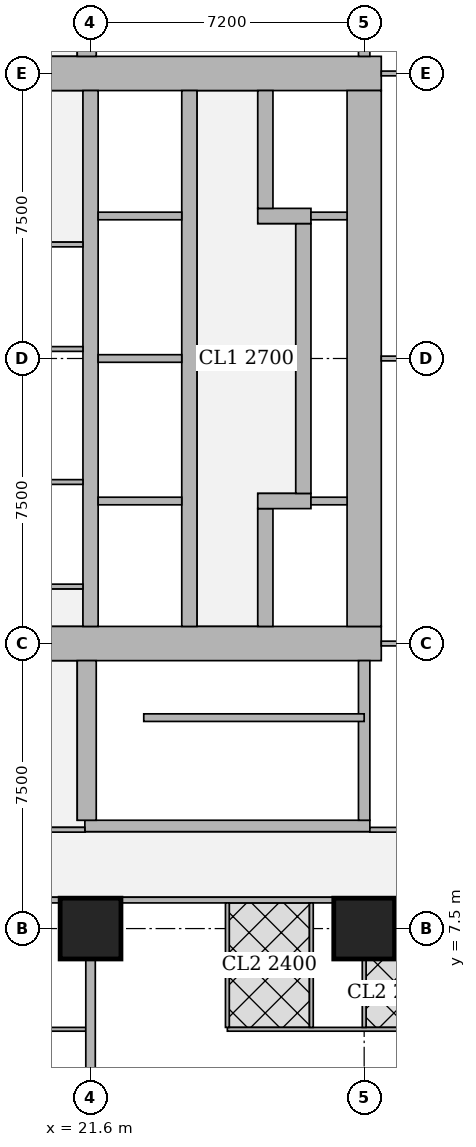
"""IFC4 building model, lengths in metres.
Left out: names, types, materials, properties, quantities, classifications, styles, units other than length and angle.
Written with IfcOpenShell. Run it as: python <this file> out.ifc"""

import sys

from ifc_helpers import new_model, si_unit, direction, frame, frame_2d, origin, origin_2d, place, context, subcontext, project, spatial, rectangle, extrude, element, fill, save


model = new_model("IFC4")
c1 = context("Model", 3, precision=1e-05, world=origin(), true_north=direction((0.0, 1.0)))
c2 = subcontext(c1, "Body", "Model", "MODEL_VIEW")
j1 = project(units=[si_unit("LENGTHUNIT", "METRE"), si_unit("PLANEANGLEUNIT", "RADIAN")], contexts=[c1])
p1 = place(None, origin())
s1 = spatial("IfcSite", under=j1, at=p1, CompositionType="ELEMENT")
p2 = place(p1, origin())
s2 = spatial("IfcBuilding", under=s1, at=p2, CompositionType="ELEMENT")
p3 = place(p2, frame((0.0, 0.0, 100.4)))
s3 = spatial("IfcBuildingStorey", under=s2, at=p3, CompositionType="ELEMENT", Elevation=100.4)
for number, where, z_axis, x_axis in (
    (1, (21.6, 7.5, 0.0), (0.0, 0.0, 1.0), (1.0, 0.0, 0.0)),
    (2, (28.8, 7.5, 0.0), (0.0, 0.0, 1.0), (1.0, 0.0, 0.0)),
):
    element("IfcColumn", number, at=place(p3, frame(where, z_axis=z_axis, x_axis=x_axis)), inside=s3, PredefinedType="COLUMN", context=c2, shape_type="SweptSolid", body=[
        extrude(rectangle(XDim=1.6, YDim=1.6, at=origin_2d()), origin(), (0.0, 0.0, 1.0), 3.75),
    ])
p4 = place(p3, frame((13.95, 15.0, 0.0), z_axis=(0.0, 0.0, 1.0), x_axis=(1.0, 0.0, 0.0)))
e3 = element("IfcWall", 3, at=p4, inside=s3, PredefinedType="SHEAR", context=c2, shape_type="SweptSolid", body=[
    extrude(rectangle(XDim=15.3, YDim=0.9, at=frame_2d((7.65, 0.0))), origin(), (0.0, 0.0, 1.0), 3.75),
])
p5 = place(p4, frame((4.45, 0.0, 0.0)))
e4 = element("IfcOpeningElement", 4, at=p5, cuts=e3, PredefinedType="OPENING", context=c2, shape_type="SweptSolid", body=[
    extrude(rectangle(XDim=1.8, YDim=2.1, at=frame_2d((0.9, 1.05))), frame((0.0, 0.46, 0.0), z_axis=(0.0, -1.0, 0.0), x_axis=(1.0, 0.0, 0.0)), (0.0, 0.0, 1.0), 0.92),
])
p6 = place(p4, frame((10.7, 0.0, 0.0)))
e5 = element("IfcOpeningElement", 5, at=p6, cuts=e3, PredefinedType="OPENING", context=c2, shape_type="SweptSolid", body=[
    extrude(rectangle(XDim=1.1, YDim=2.1, at=frame_2d((0.55, 1.05))), frame((0.0, 0.46, 0.0), z_axis=(0.0, -1.0, 0.0), x_axis=(1.0, 0.0, 0.0)), (0.0, 0.0, 1.0), 0.92),
])
p7 = place(p3, frame((13.95, 30.0, 0.0), z_axis=(0.0, 0.0, 1.0), x_axis=(1.0, 0.0, 0.0)))
e6 = element("IfcWall", 6, at=p7, inside=s3, PredefinedType="SHEAR", context=c2, shape_type="SweptSolid", body=[
    extrude(rectangle(XDim=15.3, YDim=0.9, at=frame_2d((7.65, 0.0))), origin(), (0.0, 0.0, 1.0), 3.75),
])
p8 = place(p7, frame((4.45, 0.0, 0.0)))
e7 = element("IfcOpeningElement", 7, at=p8, cuts=e6, PredefinedType="OPENING", context=c2, shape_type="SweptSolid", body=[
    extrude(rectangle(XDim=1.8, YDim=2.1, at=frame_2d((0.9, 1.05))), frame((0.0, 0.46, 0.0), z_axis=(0.0, -1.0, 0.0), x_axis=(1.0, 0.0, 0.0)), (0.0, 0.0, 1.0), 0.92),
])
p9 = place(p7, frame((10.7, 0.0, 0.0)))
e8 = element("IfcOpeningElement", 8, at=p9, cuts=e6, PredefinedType="OPENING", context=c2, shape_type="SweptSolid", body=[
    extrude(rectangle(XDim=1.1, YDim=2.1, at=frame_2d((0.55, 1.05))), frame((0.0, 0.46, 0.0), z_axis=(0.0, -1.0, 0.0), x_axis=(1.0, 0.0, 0.0)), (0.0, 0.0, 1.0), 0.92),
])
p10 = place(p3, frame((28.8, 15.45, 0.0), z_axis=(0.0, 0.0, 1.0), x_axis=(0.0, 1.0, 0.0)))
e9 = element("IfcWall", 9, at=p10, inside=s3, PredefinedType="SHEAR", context=c2, shape_type="SweptSolid", body=[
    extrude(rectangle(XDim=14.1, YDim=0.9, at=frame_2d((7.05, 0.0))), origin(), (0.0, 0.0, 1.0), 3.75),
])
for number, where, z_axis, x_axis in (
    (10, (21.6, 15.45, 0.0), (0.0, 0.0, 1.0), (0.0, 1.0, 0.0)),
    (11, (24.2, 15.45, 0.0), (0.0, 0.0, 1.0), (0.0, 1.0, 0.0)),
):
    element("IfcWall", number, at=place(p3, frame(where, z_axis=z_axis, x_axis=x_axis)), inside=s3, PredefinedType="SHEAR", context=c2, shape_type="SweptSolid", body=[
        extrude(rectangle(XDim=14.1, YDim=0.4, at=frame_2d((7.05, 0.0))), origin(), (0.0, 0.0, 1.0), 3.75),
    ])
p11 = place(p3, frame((26.2, 15.45, 0.0), z_axis=(0.0, 0.0, 1.0), x_axis=(0.0, 1.0, 0.0)))
e12 = element("IfcWall", 12, at=p11, inside=s3, PredefinedType="SHEAR", context=c2, shape_type="SweptSolid", body=[
    extrude(rectangle(XDim=3.1, YDim=0.4, at=frame_2d((1.55, 0.0))), origin(), (0.0, 0.0, 1.0), 3.75),
])
p12 = place(p11, frame((0.825, 0.0, 0.0)))
e13 = element("IfcOpeningElement", 13, at=p12, cuts=e12, PredefinedType="OPENING", context=c2, shape_type="SweptSolid", body=[
    extrude(rectangle(XDim=1.2, YDim=2.1, at=frame_2d((0.6, 1.05))), frame((0.0, 0.21, 0.0), z_axis=(0.0, -1.0, 0.0), x_axis=(1.0, 0.0, 0.0)), (0.0, 0.0, 1.0), 0.42),
])
p13 = place(p3, frame((26.0, 18.75, 0.0), z_axis=(0.0, 0.0, 1.0), x_axis=(1.0, 0.0, 0.0)))
e14 = element("IfcWall", 14, at=p13, inside=s3, PredefinedType="SHEAR", context=c2, shape_type="SweptSolid", body=[
    extrude(rectangle(XDim=1.4, YDim=0.4, at=frame_2d((0.7, 0.0))), origin(), (0.0, 0.0, 1.0), 3.75),
])
p14 = place(p3, frame((27.2, 18.95, 0.0), z_axis=(0.0, 0.0, 1.0), x_axis=(0.0, 1.0, 0.0)))
e15 = element("IfcWall", 15, at=p14, inside=s3, PredefinedType="SHEAR", context=c2, shape_type="SweptSolid", body=[
    extrude(rectangle(XDim=7.1, YDim=0.4, at=frame_2d((3.55, 0.0))), origin(), (0.0, 0.0, 1.0), 3.75),
])
p15 = place(p3, frame((26.0, 26.25, 0.0), z_axis=(0.0, 0.0, 1.0), x_axis=(1.0, 0.0, 0.0)))
e16 = element("IfcWall", 16, at=p15, inside=s3, PredefinedType="SHEAR", context=c2, shape_type="SweptSolid", body=[
    extrude(rectangle(XDim=1.4, YDim=0.4, at=frame_2d((0.7, 0.0))), origin(), (0.0, 0.0, 1.0), 3.75),
])
p16 = place(p3, frame((26.2, 26.45, 0.0), z_axis=(0.0, 0.0, 1.0), x_axis=(0.0, 1.0, 0.0)))
e17 = element("IfcWall", 17, at=p16, inside=s3, PredefinedType="SHEAR", context=c2, shape_type="SweptSolid", body=[
    extrude(rectangle(XDim=3.1, YDim=0.4, at=frame_2d((1.55, 0.0))), origin(), (0.0, 0.0, 1.0), 3.75),
])
p17 = place(p16, frame((1.075, 0.0, 0.0)))
e18 = element("IfcOpeningElement", 18, at=p17, cuts=e17, PredefinedType="OPENING", context=c2, shape_type="SweptSolid", body=[
    extrude(rectangle(XDim=1.2, YDim=2.1, at=frame_2d((0.6, 1.05))), frame((0.0, 0.21, 0.0), z_axis=(0.0, -1.0, 0.0), x_axis=(1.0, 0.0, 0.0)), (0.0, 0.0, 1.0), 0.42),
])
p18 = place(p3, frame((21.45, 10.2, 0.0), z_axis=(0.0, 0.0, 1.0), x_axis=(1.0, 0.0, 0.0)))
e19 = element("IfcWall", 19, at=p18, inside=s3, PredefinedType="SHEAR", context=c2, shape_type="SweptSolid", body=[
    extrude(rectangle(XDim=7.5, YDim=0.3, at=frame_2d((3.75, 0.0))), origin(), (0.0, 0.0, 1.0), 3.75),
])
p19 = place(p18, frame((0.5, 0.0, 0.0)))
e20 = element("IfcOpeningElement", 20, at=p19, cuts=e19, PredefinedType="OPENING", context=c2, shape_type="SweptSolid", body=[
    extrude(rectangle(XDim=1.1, YDim=2.1, at=frame_2d((0.55, 1.05))), frame((0.0, 0.16, 0.0), z_axis=(0.0, -1.0, 0.0), x_axis=(1.0, 0.0, 0.0)), (0.0, 0.0, 1.0), 0.32),
])
p20 = place(p3, frame((21.5, 10.35, 0.0), z_axis=(0.0, 0.0, 1.0), x_axis=(0.0, 1.0, 0.0)))
e21 = element("IfcWall", 21, at=p20, inside=s3, PredefinedType="SHEAR", context=c2, shape_type="SweptSolid", body=[
    extrude(rectangle(XDim=4.2, YDim=0.5, at=frame_2d((2.1, 0.0))), origin(), (0.0, 0.0, 1.0), 3.75),
])
p21 = place(p3, frame((28.8, 10.35, 0.0), z_axis=(0.0, 0.0, 1.0), x_axis=(0.0, 1.0, 0.0)))
e22 = element("IfcWall", 22, at=p21, inside=s3, PredefinedType="SHEAR", context=c2, shape_type="SweptSolid", body=[
    extrude(rectangle(XDim=4.2, YDim=0.3, at=frame_2d((2.1, 0.0))), origin(), (0.0, 0.0, 1.0), 3.75),
])
p22 = place(p3, frame((21.5, 30.45, 0.0), z_axis=(0.0, 0.0, 1.0), x_axis=(0.0, 1.0, 0.0)))
e23 = element("IfcWall", 23, at=p22, inside=s3, PredefinedType="SHEAR", context=c2, shape_type="SweptSolid", body=[
    extrude(rectangle(XDim=4.2, YDim=0.5, at=frame_2d((2.1, 0.0))), origin(), (0.0, 0.0, 1.0), 3.75),
])
p23 = place(p3, frame((28.8, 30.45, 0.0), z_axis=(0.0, 0.0, 1.0), x_axis=(0.0, 1.0, 0.0)))
e24 = element("IfcWall", 24, at=p23, inside=s3, PredefinedType="SHEAR", context=c2, shape_type="SweptSolid", body=[
    extrude(rectangle(XDim=4.2, YDim=0.3, at=frame_2d((2.1, 0.0))), origin(), (0.0, 0.0, 1.0), 3.75),
])
p24 = place(p3, frame((35.199, 8.25, 0.0), z_axis=(0.0, 0.0, 1.0), x_axis=(-1.0, 0.0, 0.0)))
e25 = element("IfcWall", 25, at=p24, inside=s3, PredefinedType="SOLIDWALL", context=c2, shape_type="SweptSolid", body=[
    extrude(rectangle(XDim=5.598, YDim=0.15, at=frame_2d((2.799, 0.0))), origin(), (0.0, 0.0, 1.0), 3.5),
])
p25 = place(p24, frame((0.699, 0.0, 0.0)))
e26 = element("IfcOpeningElement", 26, at=p25, cuts=e25, PredefinedType="OPENING", context=c2, shape_type="SweptSolid", body=[
    extrude(rectangle(XDim=1.0, YDim=2.1, at=frame_2d((0.5, 1.05))), frame((0.0, 0.085, 0.0), z_axis=(0.0, -1.0, 0.0), x_axis=(1.0, 0.0, 0.0)), (0.0, 0.0, 1.0), 0.17),
])
p26 = place(p3, frame((27.999, 8.25, 0.0), z_axis=(0.0, 0.0, 1.0), x_axis=(-1.0, 0.0, 0.0)))
e27 = element("IfcWall", 27, at=p26, inside=s3, PredefinedType="SOLIDWALL", context=c2, shape_type="SweptSolid", body=[
    extrude(rectangle(XDim=5.598, YDim=0.15, at=frame_2d((2.799, 0.0))), origin(), (0.0, 0.0, 1.0), 3.5),
])
p27 = place(p26, frame((3.899, 0.0, 0.0)))
e28 = element("IfcOpeningElement", 28, at=p27, cuts=e27, PredefinedType="OPENING", context=c2, shape_type="SweptSolid", body=[
    extrude(rectangle(XDim=1.0, YDim=2.1, at=frame_2d((0.5, 1.05))), frame((0.0, 0.085, 0.0), z_axis=(0.0, -1.0, 0.0), x_axis=(1.0, 0.0, 0.0)), (0.0, 0.0, 1.0), 0.17),
])
p28 = place(p3, frame((20.799, 8.25, 0.0), z_axis=(0.0, 0.0, 1.0), x_axis=(-1.0, 0.0, 0.0)))
e29 = element("IfcWall", 29, at=p28, inside=s3, PredefinedType="SOLIDWALL", context=c2, shape_type="SweptSolid", body=[
    extrude(rectangle(XDim=5.598, YDim=0.15, at=frame_2d((2.799, 0.0))), origin(), (0.0, 0.0, 1.0), 3.5),
])
p29 = place(p3, frame((21.475, 4.85, 0.0), z_axis=(0.0, 0.0, 1.0), x_axis=(-1.0, 0.0, 0.0)))
e30 = element("IfcWall", 30, at=p29, inside=s3, PredefinedType="PARTITIONING", context=c2, shape_type="SweptSolid", body=[
    extrude(rectangle(XDim=7.075, YDim=0.1, at=frame_2d((3.538, 0.0))), origin(), (0.0, 0.0, 1.0), 3.5),
])
p30 = place(p29, frame((5.52, 0.0, 0.0)))
e31 = element("IfcOpeningElement", 31, at=p30, cuts=e30, PredefinedType="OPENING", context=c2, shape_type="SweptSolid", body=[
    extrude(rectangle(XDim=0.9, YDim=2.1, at=frame_2d((0.45, 1.05))), frame((0.0, 0.06, 0.0), z_axis=(0.0, -1.0, 0.0), x_axis=(1.0, 0.0, 0.0)), (0.0, 0.0, 1.0), 0.12),
])
p31 = place(p29, frame((2.225, 0.0, 0.0)))
e32 = element("IfcOpeningElement", 32, at=p31, cuts=e30, PredefinedType="OPENING", context=c2, shape_type="SweptSolid", body=[
    extrude(rectangle(XDim=0.9, YDim=2.1, at=frame_2d((0.45, 1.05))), frame((0.0, 0.06, 0.0), z_axis=(0.0, -1.0, 0.0), x_axis=(1.0, 0.0, 0.0)), (0.0, 0.0, 1.0), 0.12),
])
p32 = place(p29, frame((3.72, 0.0, 0.0)))
e33 = element("IfcOpeningElement", 33, at=p32, cuts=e30, PredefinedType="OPENING", context=c2, shape_type="SweptSolid", body=[
    extrude(rectangle(XDim=0.9, YDim=2.1, at=frame_2d((0.45, 1.05))), frame((0.0, 0.06, 0.0), z_axis=(0.0, -1.0, 0.0), x_axis=(1.0, 0.0, 0.0)), (0.0, 0.0, 1.0), 0.12),
])
p33 = place(p29, frame((0.425, 0.0, 0.0)))
e34 = element("IfcOpeningElement", 34, at=p33, cuts=e30, PredefinedType="OPENING", context=c2, shape_type="SweptSolid", body=[
    extrude(rectangle(XDim=0.9, YDim=2.1, at=frame_2d((0.45, 1.05))), frame((0.0, 0.06, 0.0), z_axis=(0.0, -1.0, 0.0), x_axis=(1.0, 0.0, 0.0)), (0.0, 0.0, 1.0), 0.12),
])
p34 = place(p3, frame((32.275, 4.85, 0.0), z_axis=(0.0, 0.0, 1.0), x_axis=(-1.0, 0.0, 0.0)))
e35 = element("IfcWall", 35, at=p34, inside=s3, PredefinedType="PARTITIONING", context=c2, shape_type="SweptSolid", body=[
    extrude(rectangle(XDim=7.075, YDim=0.1, at=frame_2d((3.538, 0.0))), origin(), (0.0, 0.0, 1.0), 3.5),
])
p35 = place(p34, frame((5.52, 0.0, 0.0)))
e36 = element("IfcOpeningElement", 36, at=p35, cuts=e35, PredefinedType="OPENING", context=c2, shape_type="SweptSolid", body=[
    extrude(rectangle(XDim=0.9, YDim=2.1, at=frame_2d((0.45, 1.05))), frame((0.0, 0.06, 0.0), z_axis=(0.0, -1.0, 0.0), x_axis=(1.0, 0.0, 0.0)), (0.0, 0.0, 1.0), 0.12),
])
p36 = place(p34, frame((2.225, 0.0, 0.0)))
e37 = element("IfcOpeningElement", 37, at=p36, cuts=e35, PredefinedType="OPENING", context=c2, shape_type="SweptSolid", body=[
    extrude(rectangle(XDim=0.9, YDim=2.1, at=frame_2d((0.45, 1.05))), frame((0.0, 0.06, 0.0), z_axis=(0.0, -1.0, 0.0), x_axis=(1.0, 0.0, 0.0)), (0.0, 0.0, 1.0), 0.12),
])
p37 = place(p34, frame((3.72, 0.0, 0.0)))
e38 = element("IfcOpeningElement", 38, at=p37, cuts=e35, PredefinedType="OPENING", context=c2, shape_type="SweptSolid", body=[
    extrude(rectangle(XDim=0.9, YDim=2.1, at=frame_2d((0.45, 1.05))), frame((0.0, 0.06, 0.0), z_axis=(0.0, -1.0, 0.0), x_axis=(1.0, 0.0, 0.0)), (0.0, 0.0, 1.0), 0.12),
])
p38 = place(p34, frame((0.425, 0.0, 0.0)))
e39 = element("IfcOpeningElement", 39, at=p38, cuts=e35, PredefinedType="OPENING", context=c2, shape_type="SweptSolid", body=[
    extrude(rectangle(XDim=0.9, YDim=2.1, at=frame_2d((0.45, 1.05))), frame((0.0, 0.06, 0.0), z_axis=(0.0, -1.0, 0.0), x_axis=(1.0, 0.0, 0.0)), (0.0, 0.0, 1.0), 0.12),
])
p39 = place(p3, frame((25.2, 4.9, 0.0), z_axis=(0.0, 0.0, 1.0), x_axis=(0.0, 1.0, 0.0)))
e40 = element("IfcWall", 40, at=p39, inside=s3, PredefinedType="PARTITIONING", context=c2, shape_type="SweptSolid", body=[
    extrude(rectangle(XDim=3.275, YDim=0.1, at=frame_2d((1.638, 0.0))), origin(), (0.0, 0.0, 1.0), 3.5),
])
p40 = place(p3, frame((28.8, 4.9, 0.0), z_axis=(0.0, 0.0, 1.0), x_axis=(0.0, 1.0, 0.0)))
e41 = element("IfcWall", 41, at=p40, inside=s3, PredefinedType="PARTITIONING", context=c2, shape_type="SweptSolid", body=[
    extrude(rectangle(XDim=1.799, YDim=0.1, at=frame_2d((0.899, 0.0))), origin(), (0.0, 0.0, 1.0), 3.5),
])
p41 = place(p3, frame((27.41, 4.9, 0.0), z_axis=(0.0, 0.0, 1.0), x_axis=(0.0, 1.0, 0.0)))
e42 = element("IfcWall", 42, at=p41, inside=s3, PredefinedType="PARTITIONING", context=c2, shape_type="SweptSolid", body=[
    extrude(rectangle(XDim=3.275, YDim=0.1, at=frame_2d((1.638, 0.0))), origin(), (0.0, 0.0, 1.0), 3.5),
])
p42 = place(p3, frame((21.6, 3.65, 0.0), z_axis=(0.0, 0.0, 1.0), x_axis=(0.0, 1.0, 0.0)))
e43 = element("IfcWall", 43, at=p42, inside=s3, PredefinedType="SOLIDWALL", context=c2, shape_type="SweptSolid", body=[
    extrude(rectangle(XDim=3.049, YDim=0.25, at=frame_2d((1.524, 0.0))), origin(), (0.0, 0.0, 1.0), 3.5),
])
p43 = place(p3, frame((10.163, 10.1, 0.0), z_axis=(0.0, 0.0, 1.0), x_axis=(1.0, 0.0, 0.0)))
e44 = element("IfcWall", 44, at=p43, inside=s3, PredefinedType="PARTITIONING", context=c2, shape_type="SweptSolid", body=[
    extrude(rectangle(XDim=11.287, YDim=0.125, at=frame_2d((5.644, 0.0))), origin(), (0.0, 0.0, 1.0), 3.5),
])
p44 = place(p43, frame((7.832, 0.0, 0.0)))
e45 = element("IfcOpeningElement", 45, at=p44, cuts=e44, PredefinedType="OPENING", context=c2, shape_type="SweptSolid", body=[
    extrude(rectangle(XDim=1.8, YDim=2.1, at=frame_2d((0.9, 1.05))), frame((0.0, 0.073, 0.0), z_axis=(0.0, -1.0, 0.0), x_axis=(1.0, 0.0, 0.0)), (0.0, 0.0, 1.0), 0.145),
])
p45 = place(p3, frame((28.95, 10.1, 0.0), z_axis=(0.0, 0.0, 1.0), x_axis=(1.0, 0.0, 0.0)))
e46 = element("IfcWall", 46, at=p45, inside=s3, PredefinedType="PARTITIONING", context=c2, shape_type="SweptSolid", body=[
    extrude(rectangle(XDim=9.188, YDim=0.125, at=frame_2d((4.594, 0.0))), origin(), (0.0, 0.0, 1.0), 3.5),
])
p46 = place(p3, frame((29.25, 15.0, 0.0), z_axis=(0.0, 0.0, 1.0), x_axis=(1.0, 0.0, 0.0)))
e47 = element("IfcWall", 47, at=p46, inside=s3, PredefinedType="PARTITIONING", context=c2, shape_type="SweptSolid", body=[
    extrude(rectangle(XDim=5.949, YDim=0.125, at=frame_2d((2.975, 0.0))), origin(), (0.0, 0.0, 1.0), 3.5),
])
for number, where, z_axis, x_axis in (
    (48, (29.25, 22.5, 0.0), (0.0, 0.0, 1.0), (1.0, 0.0, 0.0)),
    (49, (29.25, 30.0, 0.0), (0.0, 0.0, 1.0), (1.0, 0.0, 0.0)),
):
    element("IfcWall", number, at=place(p3, frame(where, z_axis=z_axis, x_axis=x_axis)), inside=s3, PredefinedType="PARTITIONING", context=c2, shape_type="SweptSolid", body=[
        extrude(rectangle(XDim=2.949, YDim=0.125, at=frame_2d((1.475, 0.0))), origin(), (0.0, 0.0, 1.0), 3.5),
    ])
for number, where, z_axis, x_axis in (
    (50, (20.363, 16.5, 0.0), (0.0, 0.0, 1.0), (1.0, 0.0, 0.0)),
    (51, (20.363, 25.5, 0.0), (0.0, 0.0, 1.0), (1.0, 0.0, 0.0)),
    (52, (20.363, 19.25, 0.0), (0.0, 0.0, 1.0), (1.0, 0.0, 0.0)),
    (53, (20.363, 22.75, 0.0), (0.0, 0.0, 1.0), (1.0, 0.0, 0.0)),
):
    element("IfcWall", number, at=place(p3, frame(where, z_axis=z_axis, x_axis=x_axis)), inside=s3, PredefinedType="PARTITIONING", context=c2, shape_type="SweptSolid", body=[
        extrude(rectangle(XDim=1.037, YDim=0.125, at=frame_2d((0.519, 0.0))), origin(), (0.0, 0.0, 1.0), 3.5),
    ])
p47 = place(p3, frame((23.0, 13.05, 0.0), z_axis=(0.0, 0.0, 1.0), x_axis=(1.0, 0.0, 0.0)))
e54 = element("IfcWall", 54, at=p47, inside=s3, PredefinedType="SHEAR", context=c2, shape_type="SweptSolid", body=[
    extrude(rectangle(XDim=5.8, YDim=0.2, at=frame_2d((2.9, 0.0))), origin(), (0.0, 0.0, 1.0), 3.75),
])
for number, where, z_axis, x_axis in (
    (55, (21.8, 18.75, 0.0), (0.0, 0.0, 1.0), (1.0, 0.0, 0.0)),
    (56, (21.8, 22.5, 0.0), (0.0, 0.0, 1.0), (1.0, 0.0, 0.0)),
    (57, (21.8, 26.25, 0.0), (0.0, 0.0, 1.0), (1.0, 0.0, 0.0)),
):
    element("IfcWall", number, at=place(p3, frame(where, z_axis=z_axis, x_axis=x_axis)), inside=s3, PredefinedType="SOLIDWALL", context=c2, shape_type="SweptSolid", body=[
        extrude(rectangle(XDim=2.2, YDim=0.2, at=frame_2d((1.1, 0.0))), origin(), (0.0, 0.0, 1.0), 3.5),
    ])
for number, where, z_axis, x_axis in (
    (58, (27.4, 18.75, 0.0), (0.0, 0.0, 1.0), (1.0, 0.0, 0.0)),
    (59, (27.4, 26.25, 0.0), (0.0, 0.0, 1.0), (1.0, 0.0, 0.0)),
):
    element("IfcWall", number, at=place(p3, frame(where, z_axis=z_axis, x_axis=x_axis)), inside=s3, PredefinedType="SOLIDWALL", context=c2, shape_type="SweptSolid", body=[
        extrude(rectangle(XDim=0.95, YDim=0.2, at=frame_2d((0.475, 0.0))), origin(), (0.0, 0.0, 1.0), 3.5),
    ])
p48 = place(p33, origin())
e60 = element("IfcDoor", 60, at=p48, inside=s3, OperationType="SINGLE_SWING_RIGHT", PredefinedType="DOOR", context=c2, shape_type="SweptSolid", body=[
    extrude(rectangle(XDim=0.9, YDim=2.1, at=frame_2d((0.45, 1.05))), frame((0.0, 0.025, 0.0), z_axis=(0.0, -1.0, 0.0), x_axis=(1.0, 0.0, 0.0)), (0.0, 0.0, 1.0), 0.05),
])
fill(e34, e60)
p49 = place(p35, origin())
e61 = element("IfcDoor", 61, at=p49, inside=s3, OperationType="SINGLE_SWING_LEFT", PredefinedType="DOOR", context=c2, shape_type="SweptSolid", body=[
    extrude(rectangle(XDim=0.9, YDim=2.1, at=frame_2d((0.45, 1.05))), frame((0.0, 0.025, 0.0), z_axis=(0.0, -1.0, 0.0), x_axis=(1.0, 0.0, 0.0)), (0.0, 0.0, 1.0), 0.05),
])
fill(e36, e61)
p50 = place(p36, origin())
e62 = element("IfcDoor", 62, at=p50, inside=s3, OperationType="SINGLE_SWING_RIGHT", PredefinedType="DOOR", context=c2, shape_type="SweptSolid", body=[
    extrude(rectangle(XDim=0.9, YDim=2.1, at=frame_2d((0.45, 1.05))), frame((0.0, 0.025, 0.0), z_axis=(0.0, -1.0, 0.0), x_axis=(1.0, 0.0, 0.0)), (0.0, 0.0, 1.0), 0.05),
])
fill(e37, e62)
p51 = place(p37, origin())
e63 = element("IfcDoor", 63, at=p51, inside=s3, OperationType="SINGLE_SWING_RIGHT", PredefinedType="DOOR", context=c2, shape_type="SweptSolid", body=[
    extrude(rectangle(XDim=0.9, YDim=2.1, at=frame_2d((0.45, 1.05))), frame((0.0, 0.025, 0.0), z_axis=(0.0, -1.0, 0.0), x_axis=(1.0, 0.0, 0.0)), (0.0, 0.0, 1.0), 0.05),
])
fill(e38, e63)
p52 = place(p27, origin())
e64 = element("IfcDoor", 64, at=p52, inside=s3, OperationType="SINGLE_SWING_RIGHT", PredefinedType="DOOR", context=c2, shape_type="SweptSolid", body=[
    extrude(rectangle(XDim=1.0, YDim=2.1, at=frame_2d((0.5, 1.05))), frame((0.0, 0.025, 0.0), z_axis=(0.0, -1.0, 0.0), x_axis=(1.0, 0.0, 0.0)), (0.0, 0.0, 1.0), 0.05),
])
fill(e28, e64)
p53 = place(p6, origin())
e65 = element("IfcDoor", 65, at=p53, inside=s3, OperationType="SINGLE_SWING_LEFT", PredefinedType="DOOR", context=c2, shape_type="SweptSolid", body=[
    extrude(rectangle(XDim=1.1, YDim=2.1, at=frame_2d((0.55, 1.05))), frame((0.0, 0.025, 0.0), z_axis=(0.0, -1.0, 0.0), x_axis=(1.0, 0.0, 0.0)), (0.0, 0.0, 1.0), 0.05),
])
fill(e5, e65)
p54 = place(p9, origin())
e66 = element("IfcDoor", 66, at=p54, inside=s3, OperationType="SINGLE_SWING_LEFT", PredefinedType="DOOR", context=c2, shape_type="SweptSolid", body=[
    extrude(rectangle(XDim=1.1, YDim=2.1, at=frame_2d((0.55, 1.05))), frame((0.0, 0.025, 0.0), z_axis=(0.0, -1.0, 0.0), x_axis=(1.0, 0.0, 0.0)), (0.0, 0.0, 1.0), 0.05),
])
fill(e8, e66)
p55 = place(p12, origin())
e67 = element("IfcDoor", 67, at=p55, inside=s3, OperationType="DOUBLE_DOOR_SLIDING", PredefinedType="DOOR", context=c2, shape_type="SweptSolid", body=[
    extrude(rectangle(XDim=1.2, YDim=2.1, at=frame_2d((0.6, 1.05))), frame((0.0, 0.025, 0.0), z_axis=(0.0, -1.0, 0.0), x_axis=(1.0, 0.0, 0.0)), (0.0, 0.0, 1.0), 0.05),
])
fill(e13, e67)
p56 = place(p17, origin())
e68 = element("IfcDoor", 68, at=p56, inside=s3, OperationType="DOUBLE_DOOR_SLIDING", PredefinedType="DOOR", context=c2, shape_type="SweptSolid", body=[
    extrude(rectangle(XDim=1.2, YDim=2.1, at=frame_2d((0.6, 1.05))), frame((0.0, 0.025, 0.0), z_axis=(0.0, -1.0, 0.0), x_axis=(1.0, 0.0, 0.0)), (0.0, 0.0, 1.0), 0.05),
])
fill(e18, e68)
p57 = place(p19, origin())
e69 = element("IfcDoor", 69, at=p57, inside=s3, OperationType="SINGLE_SWING_LEFT", PredefinedType="DOOR", context=c2, shape_type="SweptSolid", body=[
    extrude(rectangle(XDim=1.1, YDim=2.1, at=frame_2d((0.55, 1.05))), frame((0.0, 0.025, 0.0), z_axis=(0.0, -1.0, 0.0), x_axis=(1.0, 0.0, 0.0)), (0.0, 0.0, 1.0), 0.05),
])
fill(e20, e69)
save(model, sys.argv[1])
